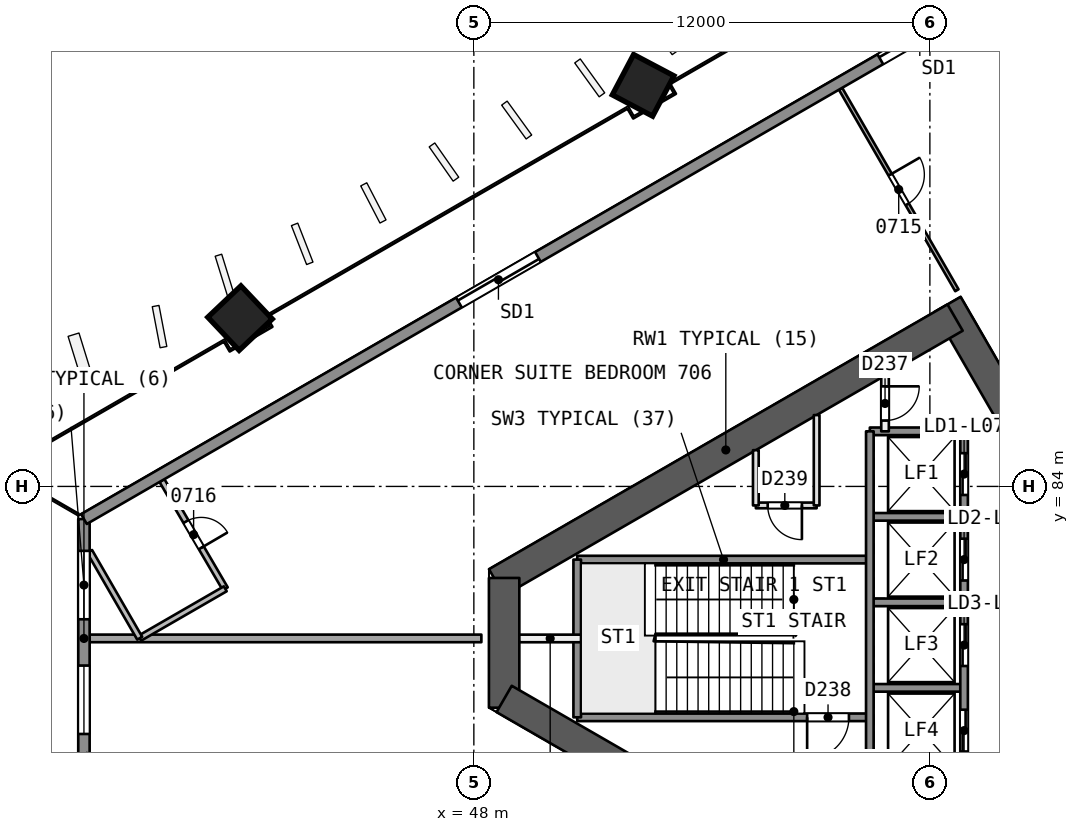
"""IFC4 building model, lengths in metres.
Left out: names, types, materials, properties, quantities, classifications, styles, units other than length and angle.
Written with IfcOpenShell. Run it as: python <this file> out.ifc"""

import sys

from ifc_helpers import new_model, si_unit, direction, frame, frame_2d, origin, origin_2d, place, context, subcontext, project, spatial, rectangle, extrude, element, fill, save


model = new_model("IFC4")
c1 = context("Model", 3, precision=1e-05, world=origin(), true_north=direction((0.0, 1.0)))
c2 = subcontext(c1, "Body", "Model", "MODEL_VIEW")
j1 = project(units=[si_unit("LENGTHUNIT", "METRE"), si_unit("PLANEANGLEUNIT", "RADIAN")], contexts=[c1])
p1 = place(None, origin())
s1 = spatial("IfcSite", under=j1, at=p1, CompositionType="ELEMENT")
p2 = place(p1, origin())
s2 = spatial("IfcBuilding", under=s1, at=p2, CompositionType="ELEMENT")
p3 = place(p2, frame((0.0, 0.0, 37.4)))
s3 = spatial("IfcBuildingStorey", under=s2, at=p3, CompositionType="ELEMENT", Elevation=37.4)
p4 = place(p3, frame((65.538, 80.0, 0.0), z_axis=(0.0, 0.0, 1.0), x_axis=(-0.49999662545, 0.866027352073, 0.0)))
e1 = element("IfcWall", 1, at=p4, inside=s3, PredefinedType="SHEAR", context=c2, shape_type="SweptSolid", body=[
    extrude(rectangle(XDim=10.149, YDim=0.8, at=frame_2d((5.074, 0.0))), origin(), (0.0, 0.0, 1.0), 3.7),
])
p5 = place(p4, frame((0.719, 0.0, 0.0)))
e2 = element("IfcOpeningElement", 2, at=p5, cuts=e1, PredefinedType="OPENING", context=c2, shape_type="SweptSolid", body=[
    extrude(rectangle(XDim=1.2, YDim=2.1, at=frame_2d((0.6, 1.05))), frame((0.0, 0.411, 0.0), z_axis=(0.0, -1.0, 0.0), x_axis=(1.0, 0.0, 0.0)), (0.0, 0.0, 1.0), 0.821),
])
p6 = place(p3, frame((60.664, 88.443, 0.0), z_axis=(0.0, 0.0, 1.0), x_axis=(-0.866029478545, -0.499992942241, 0.0)))
e3 = element("IfcWall", 3, at=p6, inside=s3, PredefinedType="SHEAR", context=c2, shape_type="SweptSolid", body=[
    extrude(rectangle(XDim=13.933, YDim=0.8, at=frame_2d((6.967, 0.0))), origin(), (0.0, 0.0, 1.0), 3.7),
])
p7 = place(p3, frame((48.797, 81.592, 0.0), z_axis=(0.0, 0.0, 1.0), x_axis=(0.0, -1.0, 0.0)))
e4 = element("IfcWall", 4, at=p7, inside=s3, PredefinedType="SHEAR", context=c2, shape_type="SweptSolid", body=[
    extrude(rectangle(XDim=3.415, YDim=0.8, at=frame_2d((1.707, 0.0))), origin(), (0.0, 0.0, 1.0), 3.7),
])
p8 = place(p3, frame((48.797, 78.408, 0.0), z_axis=(0.0, 0.0, 1.0), x_axis=(0.866032504327, -0.499987701298, 0.0)))
e5 = element("IfcWall", 5, at=p8, inside=s3, PredefinedType="SHEAR", context=c2, shape_type="SweptSolid", body=[
    extrude(rectangle(XDim=14.102, YDim=0.8, at=frame_2d((7.051, 0.0))), origin(), (0.0, 0.0, 1.0), 3.7),
])
p9 = place(p3, frame((60.664, 71.557, 0.0), z_axis=(0.0, 0.0, 1.0), x_axis=(0.50000409368, 0.866023040284, 0.0)))
e6 = element("IfcWall", 6, at=p9, inside=s3, PredefinedType="SHEAR", context=c2, shape_type="SweptSolid", body=[
    extrude(rectangle(XDim=9.98, YDim=0.8, at=frame_2d((4.99, 0.0))), origin(), (0.0, 0.0, 1.0), 3.7),
])
p10 = place(p9, frame((7.83, 0.0, 0.0)))
e7 = element("IfcOpeningElement", 7, at=p10, cuts=e6, PredefinedType="OPENING", context=c2, shape_type="SweptSolid", body=[
    extrude(rectangle(XDim=1.2, YDim=2.1, at=frame_2d((0.6, 1.05))), frame((0.0, 0.411, 0.0), z_axis=(0.0, -1.0, 0.0), x_axis=(1.0, 0.0, 0.0)), (0.0, 0.0, 1.0), 0.821),
])
p11 = place(p3, frame((52.431, 94.568, 0.0), z_axis=(0.019327242333, -0.012137244332, 0.999739538582), x_axis=(-0.500205640682, 0.865671471182, 0.020179717829)))
e8 = element("IfcColumn", 8, at=p11, inside=s3, PredefinedType="COLUMN", context=c2, shape_type="SweptSolid", body=[
    extrude(rectangle(XDim=1.2, YDim=1.2, at=origin_2d()), origin(), (0.0, 0.0, 1.0), 3.701),
])
p12 = place(p3, frame((41.813, 88.438, 0.0), z_axis=(0.028557219273, -0.006859008786, 0.999568626571), x_axis=(-0.498515256127, 0.866645794777, 0.020189249707)))
e9 = element("IfcColumn", 9, at=p12, inside=s3, PredefinedType="COLUMN", context=c2, shape_type="SweptSolid", body=[
    extrude(rectangle(XDim=1.2, YDim=1.2, at=origin_2d()), origin(), (0.0, 0.0, 1.0), 3.702),
])
p13 = place(p3, frame((57.649, 94.464, 0.0), z_axis=(0.0, 0.0, 1.0), x_axis=(0.499985929336, -0.866033527334, 0.0)))
e10 = element("IfcWall", 10, at=p13, inside=s3, PredefinedType="PARTITIONING", context=c2, shape_type="SweptSolid", body=[
    extrude(rectangle(XDim=6.123, YDim=0.1, at=frame_2d((3.062, 0.0))), origin(), (0.0, 0.0, 1.0), 3.2),
])
p14 = place(p13, frame((2.611, 0.0, 0.0)))
e11 = element("IfcOpeningElement", 11, at=p14, cuts=e10, PredefinedType="OPENING", context=c2, shape_type="SweptSolid", body=[
    extrude(rectangle(XDim=0.9, YDim=2.1, at=frame_2d((0.45, 1.05))), frame((0.0, 0.061, 0.0), z_axis=(0.0, -1.0, 0.0), x_axis=(1.0, 0.0, 0.0)), (0.0, 0.0, 1.0), 0.121),
])
p15 = place(p3, frame((39.793, 84.155, 0.0), z_axis=(0.0, 0.0, 1.0), x_axis=(0.504988355232, -0.863126155947, 0.0)))
e12 = element("IfcWall", 12, at=p15, inside=s3, PredefinedType="PARTITIONING", context=c2, shape_type="SweptSolid", body=[
    extrude(rectangle(XDim=3.3, YDim=0.15, at=frame_2d((1.65, 0.0))), origin(), (0.0, 0.0, 1.0), 3.2),
])
p16 = place(p15, frame((1.25, 0.0, 0.0)))
e13 = element("IfcOpeningElement", 13, at=p16, cuts=e12, PredefinedType="OPENING", context=c2, shape_type="SweptSolid", body=[
    extrude(rectangle(XDim=0.8, YDim=2.1, at=frame_2d((0.4, 1.05))), frame((0.0, 0.085, 0.0), z_axis=(0.0, -1.0, 0.0), x_axis=(1.0, 0.0, 0.0)), (0.0, 0.0, 1.0), 0.171),
])
p17 = place(p3, frame((41.459, 81.306, 0.0), z_axis=(0.0, 0.0, 1.0), x_axis=(-0.866021400173, -0.500006934395, 0.0)))
e14 = element("IfcWall", 14, at=p17, inside=s3, PredefinedType="PARTITIONING", context=c2, shape_type="SweptSolid", body=[
    extrude(rectangle(XDim=2.6, YDim=0.15, at=frame_2d((1.3, 0.0))), origin(), (0.0, 0.0, 1.0), 3.2),
])
p18 = place(p3, frame((39.208, 80.006, 0.0), z_axis=(0.0, 0.0, 1.0), x_axis=(-0.499992239852, 0.866029884062, 0.0)))
e15 = element("IfcWall", 15, at=p18, inside=s3, PredefinedType="PARTITIONING", context=c2, shape_type="SweptSolid", body=[
    extrude(rectangle(XDim=2.637, YDim=0.15, at=frame_2d((1.319, 0.0))), origin(), (0.0, 0.0, 1.0), 3.2),
])
p19 = place(p3, frame((37.889, 80.001, 0.0), z_axis=(0.0, 0.0, 1.0), x_axis=(1.0, 0.0, 0.0)))
e16 = element("IfcWall", 16, at=p19, inside=s3, PredefinedType="PARTITIONING", context=c2, shape_type="SweptSolid", body=[
    extrude(rectangle(XDim=10.309, YDim=0.2, at=frame_2d((5.155, 0.0))), origin(), (0.0, 0.0, 1.0), 3.2),
])
p20 = place(p3, frame((37.74, 76.859, 0.0), z_axis=(0.0, 0.0, 1.0), x_axis=(0.0, 1.0, 0.0)))
e17 = element("IfcWall", 17, at=p20, inside=s3, PredefinedType="SOLIDWALL", context=c2, shape_type="SweptSolid", body=[
    extrude(rectangle(XDim=6.283, YDim=0.3, at=frame_2d((3.141, 0.0))), origin(), (0.0, 0.0, 1.0), 3.2),
])
p21 = place(p20, frame((3.646, 0.0, 0.9)))
e18 = element("IfcOpeningElement", 18, at=p21, cuts=e17, PredefinedType="OPENING", context=c2, shape_type="SweptSolid", body=[
    extrude(rectangle(XDim=1.8, YDim=1.5, at=frame_2d((0.9, 0.75))), frame((0.0, 0.161, 0.0), z_axis=(0.0, -1.0, 0.0), x_axis=(1.0, 0.0, 0.0)), (0.0, 0.0, 1.0), 0.321),
])
p22 = place(p20, frame((0.628, 0.0, 0.9)))
e19 = element("IfcOpeningElement", 19, at=p22, cuts=e17, PredefinedType="OPENING", context=c2, shape_type="SweptSolid", body=[
    extrude(rectangle(XDim=1.8, YDim=1.5, at=frame_2d((0.9, 0.75))), frame((0.0, 0.161, 0.0), z_axis=(0.0, -1.0, 0.0), x_axis=(1.0, 0.0, 0.0)), (0.0, 0.0, 1.0), 0.321),
])
p23 = place(p3, frame((37.74, 83.141, 0.0), z_axis=(0.0, 0.0, 1.0), x_axis=(0.866026524777, 0.499998058379, 0.0)))
e20 = element("IfcWall", 20, at=p23, inside=s3, PredefinedType="SOLIDWALL", context=c2, shape_type="SweptSolid", body=[
    extrude(rectangle(XDim=61.395, YDim=0.3, at=frame_2d((30.698, 0.0))), origin(), (0.0, 0.0, 1.0), 3.2),
])
p24 = place(p23, frame((34.174, 0.0, 0.0)))
e21 = element("IfcOpeningElement", 21, at=p24, cuts=e20, PredefinedType="OPENING", context=c2, shape_type="SweptSolid", body=[
    extrude(rectangle(XDim=2.4, YDim=2.4, at=frame_2d((1.2, 1.2))), frame((0.0, 0.161, 0.0), z_axis=(0.0, -1.0, 0.0), x_axis=(1.0, 0.0, 0.0)), (0.0, 0.0, 1.0), 0.321),
])
p25 = place(p23, frame((47.603, 0.0, 0.0)))
e22 = element("IfcOpeningElement", 22, at=p25, cuts=e20, PredefinedType="OPENING", context=c2, shape_type="SweptSolid", body=[
    extrude(rectangle(XDim=2.4, YDim=2.4, at=frame_2d((1.2, 1.2))), frame((0.0, 0.161, 0.0), z_axis=(0.0, -1.0, 0.0), x_axis=(1.0, 0.0, 0.0)), (0.0, 0.0, 1.0), 0.321),
])
p26 = place(p23, frame((24.198, 0.0, 0.0)))
e23 = element("IfcOpeningElement", 23, at=p26, cuts=e20, PredefinedType="OPENING", context=c2, shape_type="SweptSolid", body=[
    extrude(rectangle(XDim=2.4, YDim=2.4, at=frame_2d((1.2, 1.2))), frame((0.0, 0.161, 0.0), z_axis=(0.0, -1.0, 0.0), x_axis=(1.0, 0.0, 0.0)), (0.0, 0.0, 1.0), 0.321),
])
p27 = place(p23, frame((11.394, 0.0, 0.0)))
e24 = element("IfcOpeningElement", 24, at=p27, cuts=e20, PredefinedType="OPENING", context=c2, shape_type="SweptSolid", body=[
    extrude(rectangle(XDim=2.4, YDim=2.4, at=frame_2d((1.2, 1.2))), frame((0.0, 0.161, 0.0), z_axis=(0.0, -1.0, 0.0), x_axis=(1.0, 0.0, 0.0)), (0.0, 0.0, 1.0), 0.321),
])
p28 = place(p23, frame((28.874, 0.0, 0.0)))
e25 = element("IfcOpeningElement", 25, at=p28, cuts=e20, PredefinedType="OPENING", context=c2, shape_type="SweptSolid", body=[
    extrude(rectangle(XDim=2.4, YDim=2.4, at=frame_2d((1.2, 1.2))), frame((0.0, 0.161, 0.0), z_axis=(0.0, -1.0, 0.0), x_axis=(1.0, 0.0, 0.0)), (0.0, 0.0, 1.0), 0.321),
])
p29 = place(p3, frame((60.9, 85.45, 0.0), z_axis=(0.0, 0.0, 1.0), x_axis=(-1.0, 0.0, 0.0)))
e26 = element("IfcWall", 26, at=p29, inside=s3, PredefinedType="SOLIDWALL", context=c2, shape_type="SweptSolid", body=[
    extrude(rectangle(XDim=2.48, YDim=0.2, at=frame_2d((1.24, 0.0))), origin(), (0.0, 0.0, 1.0), 3.2),
])
p30 = place(p3, frame((57.02, 83.5, 0.0), z_axis=(0.0, 0.0, 1.0), x_axis=(-1.0, 0.0, 0.0)))
e27 = element("IfcWall", 27, at=p30, inside=s3, PredefinedType="PARTITIONING", context=c2, shape_type="SweptSolid", body=[
    extrude(rectangle(XDim=1.6, YDim=0.15, at=frame_2d((0.8, 0.0))), origin(), (0.0, 0.0, 1.0), 3.2),
])
p31 = place(p30, frame((0.387, 0.0, 0.0)))
e28 = element("IfcOpeningElement", 28, at=p31, cuts=e27, PredefinedType="OPENING", context=c2, shape_type="SweptSolid", body=[
    extrude(rectangle(XDim=0.9, YDim=2.1, at=frame_2d((0.45, 1.05))), frame((0.0, 0.085, 0.0), z_axis=(0.0, -1.0, 0.0), x_axis=(1.0, 0.0, 0.0)), (0.0, 0.0, 1.0), 0.171),
])
p32 = place(p3, frame((60.9, 83.2, 0.0), z_axis=(0.0, 0.0, 1.0), x_axis=(-1.0, 0.0, 0.0)))
e29 = element("IfcWall", 29, at=p32, inside=s3, PredefinedType="SOLIDWALL", context=c2, shape_type="SweptSolid", body=[
    extrude(rectangle(XDim=2.48, YDim=0.2, at=frame_2d((1.24, 0.0))), origin(), (0.0, 0.0, 1.0), 3.2),
])
p33 = place(p3, frame((58.42, 82.075, 0.0), z_axis=(0.0, 0.0, 1.0), x_axis=(-1.0, 0.0, 0.0)))
e30 = element("IfcWall", 30, at=p33, inside=s3, PredefinedType="SOLIDWALL", context=c2, shape_type="SweptSolid", body=[
    extrude(rectangle(XDim=7.7, YDim=0.2, at=frame_2d((3.85, 0.0))), origin(), (0.0, 0.0, 1.0), 3.2),
])
p34 = place(p3, frame((60.9, 80.95, 0.0), z_axis=(0.0, 0.0, 1.0), x_axis=(-1.0, 0.0, 0.0)))
e31 = element("IfcWall", 31, at=p34, inside=s3, PredefinedType="SOLIDWALL", context=c2, shape_type="SweptSolid", body=[
    extrude(rectangle(XDim=2.48, YDim=0.2, at=frame_2d((1.24, 0.0))), origin(), (0.0, 0.0, 1.0), 3.2),
])
p35 = place(p3, frame((50.82, 80.0, 0.0), z_axis=(0.0, 0.0, 1.0), x_axis=(-1.0, 0.0, 0.0)))
e32 = element("IfcWall", 32, at=p35, inside=s3, PredefinedType="PARTITIONING", context=c2, shape_type="SweptSolid", body=[
    extrude(rectangle(XDim=1.623, YDim=0.2, at=frame_2d((0.812, 0.0))), origin(), (0.0, 0.0, 1.0), 3.2),
])
p36 = place(p3, frame((60.9, 78.7, 0.0), z_axis=(0.0, 0.0, 1.0), x_axis=(-1.0, 0.0, 0.0)))
e33 = element("IfcWall", 33, at=p36, inside=s3, PredefinedType="SOLIDWALL", context=c2, shape_type="SweptSolid", body=[
    extrude(rectangle(XDim=2.48, YDim=0.2, at=frame_2d((1.24, 0.0))), origin(), (0.0, 0.0, 1.0), 3.2),
])
p37 = place(p3, frame((58.42, 77.925, 0.0), z_axis=(0.0, 0.0, 1.0), x_axis=(-1.0, 0.0, 0.0)))
e34 = element("IfcWall", 34, at=p37, inside=s3, PredefinedType="SOLIDWALL", context=c2, shape_type="SweptSolid", body=[
    extrude(rectangle(XDim=7.7, YDim=0.2, at=frame_2d((3.85, 0.0))), origin(), (0.0, 0.0, 1.0), 3.2),
])
p38 = place(p37, frame((0.55, 0.0, 0.0)))
e35 = element("IfcOpeningElement", 35, at=p38, cuts=e34, PredefinedType="OPENING", context=c2, shape_type="SweptSolid", body=[
    extrude(rectangle(XDim=1.1, YDim=2.1, at=frame_2d((0.55, 1.05))), frame((0.0, 0.11, 0.0), z_axis=(0.0, -1.0, 0.0), x_axis=(1.0, 0.0, 0.0)), (0.0, 0.0, 1.0), 0.221),
])
p39 = place(p3, frame((60.9, 85.45, 0.0), z_axis=(0.0, 0.0, 1.0), x_axis=(0.0, -1.0, 0.0)))
e36 = element("IfcWall", 36, at=p39, inside=s3, PredefinedType="SOLIDWALL", context=c2, shape_type="SweptSolid", body=[
    extrude(rectangle(XDim=10.9, YDim=0.2, at=frame_2d((5.45, 0.0))), origin(), (0.0, 0.0, 1.0), 3.2),
])
p40 = place(p39, frame((0.575, 0.0, 0.0)))
e37 = element("IfcOpeningElement", 37, at=p40, cuts=e36, PredefinedType="OPENING", context=c2, shape_type="SweptSolid", body=[
    extrude(rectangle(XDim=1.1, YDim=2.1, at=frame_2d((0.55, 1.05))), frame((0.0, 0.11, 0.0), z_axis=(0.0, -1.0, 0.0), x_axis=(1.0, 0.0, 0.0)), (0.0, 0.0, 1.0), 0.221),
])
p41 = place(p39, frame((2.825, 0.0, 0.0)))
e38 = element("IfcOpeningElement", 38, at=p41, cuts=e36, PredefinedType="OPENING", context=c2, shape_type="SweptSolid", body=[
    extrude(rectangle(XDim=1.1, YDim=2.1, at=frame_2d((0.55, 1.05))), frame((0.0, 0.11, 0.0), z_axis=(0.0, -1.0, 0.0), x_axis=(1.0, 0.0, 0.0)), (0.0, 0.0, 1.0), 0.221),
])
p42 = place(p39, frame((5.075, 0.0, 0.0)))
e39 = element("IfcOpeningElement", 39, at=p42, cuts=e36, PredefinedType="OPENING", context=c2, shape_type="SweptSolid", body=[
    extrude(rectangle(XDim=1.1, YDim=2.1, at=frame_2d((0.55, 1.05))), frame((0.0, 0.11, 0.0), z_axis=(0.0, -1.0, 0.0), x_axis=(1.0, 0.0, 0.0)), (0.0, 0.0, 1.0), 0.221),
])
p43 = place(p39, frame((7.325, 0.0, 0.0)))
e40 = element("IfcOpeningElement", 40, at=p43, cuts=e36, PredefinedType="OPENING", context=c2, shape_type="SweptSolid", body=[
    extrude(rectangle(XDim=1.1, YDim=2.1, at=frame_2d((0.55, 1.05))), frame((0.0, 0.11, 0.0), z_axis=(0.0, -1.0, 0.0), x_axis=(1.0, 0.0, 0.0)), (0.0, 0.0, 1.0), 0.221),
])
p44 = place(p3, frame((58.82, 86.917, 0.0), z_axis=(0.0, 0.0, 1.0), x_axis=(0.0, -1.0, 0.0)))
e41 = element("IfcWall", 41, at=p44, inside=s3, PredefinedType="PARTITIONING", context=c2, shape_type="SweptSolid", body=[
    extrude(rectangle(XDim=1.467, YDim=0.2, at=frame_2d((0.733, 0.0))), origin(), (0.0, 0.0, 1.0), 3.2),
])
p45 = place(p44, frame((0.283, 0.0, 0.0)))
e42 = element("IfcOpeningElement", 42, at=p45, cuts=e41, PredefinedType="OPENING", context=c2, shape_type="SweptSolid", body=[
    extrude(rectangle(XDim=0.9, YDim=2.1, at=frame_2d((0.45, 1.05))), frame((0.0, 0.11, 0.0), z_axis=(0.0, -1.0, 0.0), x_axis=(1.0, 0.0, 0.0)), (0.0, 0.0, 1.0), 0.221),
])
p46 = place(p3, frame((58.42, 85.45, 0.0), z_axis=(0.0, 0.0, 1.0), x_axis=(0.0, -1.0, 0.0)))
e43 = element("IfcWall", 43, at=p46, inside=s3, PredefinedType="SOLIDWALL", context=c2, shape_type="SweptSolid", body=[
    extrude(rectangle(XDim=9.0, YDim=0.2, at=frame_2d((4.5, 0.0))), origin(), (0.0, 0.0, 1.0), 3.2),
])
p47 = place(p3, frame((57.02, 85.877, 0.0), z_axis=(0.0, 0.0, 1.0), x_axis=(0.0, -1.0, 0.0)))
e44 = element("IfcWall", 44, at=p47, inside=s3, PredefinedType="PARTITIONING", context=c2, shape_type="SweptSolid", body=[
    extrude(rectangle(XDim=2.377, YDim=0.15, at=frame_2d((1.189, 0.0))), origin(), (0.0, 0.0, 1.0), 3.2),
])
p48 = place(p3, frame((55.42, 84.954, 0.0), z_axis=(0.0, 0.0, 1.0), x_axis=(0.0, -1.0, 0.0)))
e45 = element("IfcWall", 45, at=p48, inside=s3, PredefinedType="PARTITIONING", context=c2, shape_type="SweptSolid", body=[
    extrude(rectangle(XDim=1.454, YDim=0.15, at=frame_2d((0.727, 0.0))), origin(), (0.0, 0.0, 1.0), 3.2),
])
p49 = place(p3, frame((50.72, 82.075, 0.0), z_axis=(0.0, 0.0, 1.0), x_axis=(0.0, -1.0, 0.0)))
e46 = element("IfcWall", 46, at=p49, inside=s3, PredefinedType="SOLIDWALL", context=c2, shape_type="SweptSolid", body=[
    extrude(rectangle(XDim=4.15, YDim=0.2, at=frame_2d((2.075, 0.0))), origin(), (0.0, 0.0, 1.0), 3.2),
])
p50 = place(p14, origin())
e47 = element("IfcDoor", 47, at=p50, inside=s3, OperationType="SINGLE_SWING_LEFT", PredefinedType="NOTDEFINED", context=c2, shape_type="SweptSolid", body=[
    extrude(rectangle(XDim=0.9, YDim=2.1, at=frame_2d((0.45, 1.05))), frame((0.0, 0.025, 0.0), z_axis=(0.0, -1.0, 0.0), x_axis=(1.0, 0.0, 0.0)), (0.0, 0.0, 1.0), 0.05),
])
fill(e11, e47)
p51 = place(p16, origin())
e48 = element("IfcDoor", 48, at=p51, inside=s3, OperationType="SINGLE_SWING_RIGHT", PredefinedType="NOTDEFINED", context=c2, shape_type="SweptSolid", body=[
    extrude(rectangle(XDim=0.8, YDim=2.1, at=frame_2d((0.4, 1.05))), frame((0.0, 0.025, 0.0), z_axis=(0.0, -1.0, 0.0), x_axis=(1.0, 0.0, 0.0)), (0.0, 0.0, 1.0), 0.05),
])
fill(e13, e48)
p52 = place(p21, origin())
e49 = element("IfcWindow", 49, at=p52, inside=s3, PartitioningType="SINGLE_PANEL", PredefinedType="WINDOW", context=c2, shape_type="SweptSolid", body=[
    extrude(rectangle(XDim=1.8, YDim=1.5, at=frame_2d((0.9, 0.75))), frame((0.0, 0.03, 0.0), z_axis=(0.0, -1.0, 0.0), x_axis=(1.0, 0.0, 0.0)), (0.0, 0.0, 1.0), 0.06),
])
fill(e18, e49)
p53 = place(p22, origin())
e50 = element("IfcWindow", 50, at=p53, inside=s3, PartitioningType="SINGLE_PANEL", PredefinedType="WINDOW", context=c2, shape_type="SweptSolid", body=[
    extrude(rectangle(XDim=1.8, YDim=1.5, at=frame_2d((0.9, 0.75))), frame((0.0, 0.03, 0.0), z_axis=(0.0, -1.0, 0.0), x_axis=(1.0, 0.0, 0.0)), (0.0, 0.0, 1.0), 0.06),
])
fill(e19, e50)
p54 = place(p26, origin())
e51 = element("IfcDoor", 51, at=p54, inside=s3, OperationType="SLIDING_TO_LEFT", PredefinedType="NOTDEFINED", context=c2, shape_type="SweptSolid", body=[
    extrude(rectangle(XDim=2.4, YDim=2.4, at=frame_2d((1.2, 1.2))), frame((0.0, 0.025, 0.0), z_axis=(0.0, -1.0, 0.0), x_axis=(1.0, 0.0, 0.0)), (0.0, 0.0, 1.0), 0.05),
])
fill(e23, e51)
p55 = place(p27, origin())
e52 = element("IfcDoor", 52, at=p55, inside=s3, OperationType="SLIDING_TO_RIGHT", PredefinedType="NOTDEFINED", context=c2, shape_type="SweptSolid", body=[
    extrude(rectangle(XDim=2.4, YDim=2.4, at=frame_2d((1.2, 1.2))), frame((0.0, 0.025, 0.0), z_axis=(0.0, -1.0, 0.0), x_axis=(1.0, 0.0, 0.0)), (0.0, 0.0, 1.0), 0.05),
])
fill(e24, e52)
p56 = place(p40, origin())
e53 = element("IfcDoor", 53, at=p56, inside=s3, OperationType="SLIDING_TO_RIGHT", PredefinedType="NOTDEFINED", context=c2, shape_type="SweptSolid", body=[
    extrude(rectangle(XDim=1.1, YDim=2.1, at=frame_2d((0.55, 1.05))), frame((0.0, 0.025, 0.0), z_axis=(0.0, -1.0, 0.0), x_axis=(1.0, 0.0, 0.0)), (0.0, 0.0, 1.0), 0.05),
])
fill(e37, e53)
p57 = place(p41, origin())
e54 = element("IfcDoor", 54, at=p57, inside=s3, OperationType="SLIDING_TO_LEFT", PredefinedType="NOTDEFINED", context=c2, shape_type="SweptSolid", body=[
    extrude(rectangle(XDim=1.1, YDim=2.1, at=frame_2d((0.55, 1.05))), frame((0.0, 0.025, 0.0), z_axis=(0.0, -1.0, 0.0), x_axis=(1.0, 0.0, 0.0)), (0.0, 0.0, 1.0), 0.05),
])
fill(e38, e54)
p58 = place(p42, origin())
e55 = element("IfcDoor", 55, at=p58, inside=s3, OperationType="SLIDING_TO_RIGHT", PredefinedType="NOTDEFINED", context=c2, shape_type="SweptSolid", body=[
    extrude(rectangle(XDim=1.1, YDim=2.1, at=frame_2d((0.55, 1.05))), frame((0.0, 0.025, 0.0), z_axis=(0.0, -1.0, 0.0), x_axis=(1.0, 0.0, 0.0)), (0.0, 0.0, 1.0), 0.05),
])
fill(e39, e55)
p59 = place(p43, origin())
e56 = element("IfcDoor", 56, at=p59, inside=s3, OperationType="SLIDING_TO_LEFT", PredefinedType="NOTDEFINED", context=c2, shape_type="SweptSolid", body=[
    extrude(rectangle(XDim=1.1, YDim=2.1, at=frame_2d((0.55, 1.05))), frame((0.0, 0.025, 0.0), z_axis=(0.0, -1.0, 0.0), x_axis=(1.0, 0.0, 0.0)), (0.0, 0.0, 1.0), 0.05),
])
fill(e40, e56)
p60 = place(p45, origin())
e57 = element("IfcDoor", 57, at=p60, inside=s3, OperationType="SINGLE_SWING_LEFT", PredefinedType="NOTDEFINED", context=c2, shape_type="SweptSolid", body=[
    extrude(rectangle(XDim=0.9, YDim=2.1, at=frame_2d((0.45, 1.05))), frame((0.0, 0.025, 0.0), z_axis=(0.0, -1.0, 0.0), x_axis=(1.0, 0.0, 0.0)), (0.0, 0.0, 1.0), 0.05),
])
fill(e42, e57)
p61 = place(p38, origin())
e58 = element("IfcDoor", 58, at=p61, inside=s3, OperationType="SINGLE_SWING_RIGHT", PredefinedType="NOTDEFINED", context=c2, shape_type="SweptSolid", body=[
    extrude(rectangle(XDim=1.1, YDim=2.1, at=frame_2d((0.55, 1.05))), frame((0.0, 0.025, 0.0), z_axis=(0.0, -1.0, 0.0), x_axis=(1.0, 0.0, 0.0)), (0.0, 0.0, 1.0), 0.05),
])
fill(e35, e58)
p62 = place(p31, origin())
e59 = element("IfcDoor", 59, at=p62, inside=s3, OperationType="SINGLE_SWING_LEFT", PredefinedType="NOTDEFINED", context=c2, shape_type="SweptSolid", body=[
    extrude(rectangle(XDim=0.9, YDim=2.1, at=frame_2d((0.45, 1.05))), frame((0.0, 0.025, 0.0), z_axis=(0.0, -1.0, 0.0), x_axis=(1.0, 0.0, 0.0)), (0.0, 0.0, 1.0), 0.05),
])
fill(e28, e59)
save(model, sys.argv[1])
